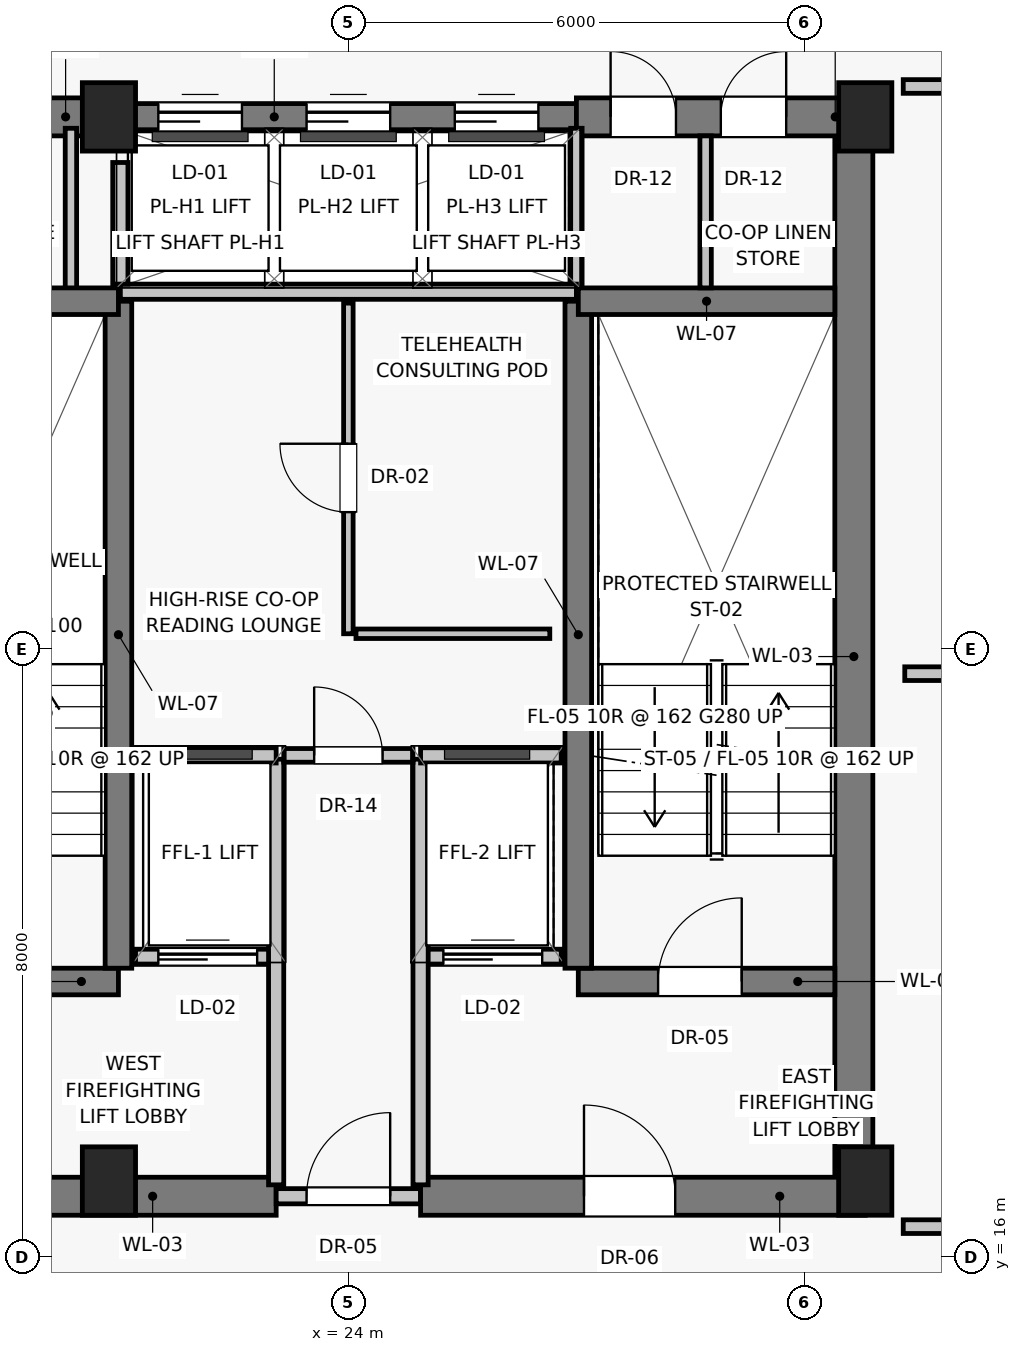
"""IFC4 building model, lengths in metres.
Left out: names, types, materials, properties, quantities, classifications, styles, units other than length and angle.
Written with IfcOpenShell. Run it as: python <this file> out.ifc"""

import sys

from ifc_helpers import new_model, si_unit, direction, frame, frame_2d, origin, origin_2d, place, context, subcontext, project, spatial, rectangle, extrude, source, transform, mapped, element, fill, save


model = new_model("IFC4")
c1 = context("Model", 3, precision=1e-05, world=origin(), true_north=direction((0.0, 1.0)))
c2 = subcontext(c1, "Body", "Model", "MODEL_VIEW")
j1 = project(units=[si_unit("LENGTHUNIT", "METRE"), si_unit("PLANEANGLEUNIT", "RADIAN")], contexts=[c1])
p1 = place(None, origin())
s1 = spatial("IfcSite", under=j1, at=p1, CompositionType="ELEMENT")
p2 = place(p1, origin())
s2 = spatial("IfcBuilding", under=s1, at=p2, CompositionType="ELEMENT")
p3 = place(p2, frame((0.0, 0.0, 222.15)))
s3 = spatial("IfcBuildingStorey", under=s2, at=p3, CompositionType="ELEMENT", Elevation=222.15)
for number, where, z_axis, x_axis in (
    (1, (20.85, 17.0, 0.0), (0.0, 0.0, 1.0), (1.0, 0.0, 0.0)),
    (2, (30.8, 17.0, 0.0), (0.0, 0.0, 1.0), (1.0, 0.0, 0.0)),
    (3, (20.85, 31.0, 0.0), (0.0, 0.0, 1.0), (1.0, 0.0, 0.0)),
    (4, (30.8, 31.0, 0.0), (0.0, 0.0, 1.0), (1.0, 0.0, 0.0)),
):
    element("IfcColumn", number, at=place(p3, frame(where, z_axis=z_axis, x_axis=x_axis)), inside=s3, PredefinedType="PILASTER", context=c2, shape_type="SweptSolid", body=[
        extrude(rectangle(XDim=0.7, YDim=0.9, at=origin_2d()), origin(), (0.0, 0.0, 1.0), 3.25),
    ])
p4 = place(p3, frame((30.65, 16.8, 0.0), z_axis=(0.0, 0.0, 1.0), x_axis=(0.0, 1.0, 0.0)))
e5 = element("IfcWall", 5, at=p4, inside=s3, PredefinedType="SHEAR", context=c2, shape_type="SweptSolid", body=[
    extrude(rectangle(XDim=14.2, YDim=0.5, at=frame_2d((7.1, 0.0))), origin(), (0.0, 0.0, 1.0), 2.93),
])
p5 = place(p3, frame((17.2, 16.8, 0.0), z_axis=(0.0, 0.0, 1.0), x_axis=(1.0, 0.0, 0.0)))
e6 = element("IfcWall", 6, at=p5, inside=s3, PredefinedType="SHEAR", context=c2, shape_type="SweptSolid", body=[
    extrude(rectangle(XDim=5.85, YDim=0.5, at=frame_2d((2.925, 0.0))), origin(), (0.0, 0.0, 1.0), 2.93),
])
p6 = place(p5, frame((1.15, 0.0, 0.0)))
e7 = element("IfcOpeningElement", 7, at=p6, cuts=e6, PredefinedType="OPENING", context=c2, shape_type="SweptSolid", body=[
    extrude(rectangle(XDim=1.2, YDim=2.03, at=frame_2d((0.6, 1.015))), frame((0.0, 0.26, 0.0), z_axis=(0.0, -1.0, 0.0), x_axis=(1.0, 0.0, 0.0)), (0.0, 0.0, 1.0), 0.52),
])
p7 = place(p3, frame((23.05, 16.8, 0.0), z_axis=(0.0, 0.0, 1.0), x_axis=(1.0, 0.0, 0.0)))
e8 = element("IfcWall", 8, at=p7, inside=s3, PredefinedType="SOLIDWALL", context=c2, shape_type="SweptSolid", body=[
    extrude(rectangle(XDim=1.9, YDim=0.2, at=frame_2d((0.95, 0.0))), origin(), (0.0, 0.0, 1.0), 2.08),
])
p8 = place(p7, frame((0.4, 0.0, 0.0)))
e9 = element("IfcOpeningElement", 9, at=p8, cuts=e8, PredefinedType="OPENING", context=c2, shape_type="SweptSolid", body=[
    extrude(rectangle(XDim=1.1, YDim=2.03, at=frame_2d((0.55, 1.015))), frame((0.0, 0.11, 0.0), z_axis=(0.0, -1.0, 0.0), x_axis=(1.0, 0.0, 0.0)), (0.0, 0.0, 1.0), 0.22),
])
p9 = place(p3, frame((24.95, 16.8, 0.0), z_axis=(0.0, 0.0, 1.0), x_axis=(1.0, 0.0, 0.0)))
e10 = element("IfcWall", 10, at=p9, inside=s3, PredefinedType="SHEAR", context=c2, shape_type="SweptSolid", body=[
    extrude(rectangle(XDim=5.85, YDim=0.5, at=frame_2d((2.925, 0.0))), origin(), (0.0, 0.0, 1.0), 2.93),
])
p10 = place(p9, frame((2.15, 0.0, 0.0)))
e11 = element("IfcOpeningElement", 11, at=p10, cuts=e10, PredefinedType="OPENING", context=c2, shape_type="SweptSolid", body=[
    extrude(rectangle(XDim=1.2, YDim=2.03, at=frame_2d((0.6, 1.015))), frame((0.0, 0.26, 0.0), z_axis=(0.0, -1.0, 0.0), x_axis=(1.0, 0.0, 0.0)), (0.0, 0.0, 1.0), 0.52),
])
p11 = place(p3, frame((17.2, 31.0, 0.0), z_axis=(0.0, 0.0, 1.0), x_axis=(1.0, 0.0, 0.0)))
e12 = element("IfcWall", 12, at=p11, inside=s3, PredefinedType="SHEAR", context=c2, shape_type="SweptSolid", body=[
    extrude(rectangle(XDim=3.8, YDim=0.5, at=frame_2d((1.9, 0.0))), origin(), (0.0, 0.0, 1.0), 2.93),
])
p12 = place(p11, frame((1.25, 0.0, 0.0)))
e13 = element("IfcOpeningElement", 13, at=p12, cuts=e12, PredefinedType="OPENING", context=c2, shape_type="SweptSolid", body=[
    extrude(rectangle(XDim=0.86, YDim=2.01, at=frame_2d((0.43, 1.005))), frame((0.0, 0.26, 0.0), z_axis=(0.0, -1.0, 0.0), x_axis=(1.0, 0.0, 0.0)), (0.0, 0.0, 1.0), 0.52),
])
p13 = place(p3, frame((21.0, 31.0, 0.0), z_axis=(0.0, 0.0, 1.0), x_axis=(1.0, 0.0, 0.0)))
e14 = element("IfcWall", 14, at=p13, inside=s3, PredefinedType="SHEAR", context=c2, shape_type="SweptSolid", body=[
    extrude(rectangle(XDim=6.0, YDim=0.35, at=frame_2d((3.0, 0.0))), origin(), (0.0, 0.0, 1.0), 2.93),
])
p14 = place(p13, frame((0.5, 0.0, 0.0)))
e15 = element("IfcOpeningElement", 15, at=p14, cuts=e14, PredefinedType="OPENING", context=c2, shape_type="SweptSolid", body=[
    extrude(rectangle(XDim=1.1, YDim=2.08, at=frame_2d((0.55, 1.04))), frame((0.0, 0.185, 0.0), z_axis=(0.0, -1.0, 0.0), x_axis=(1.0, 0.0, 0.0)), (0.0, 0.0, 1.0), 0.37),
])
p15 = place(p13, frame((2.45, 0.0, 0.0)))
e16 = element("IfcOpeningElement", 16, at=p15, cuts=e14, PredefinedType="OPENING", context=c2, shape_type="SweptSolid", body=[
    extrude(rectangle(XDim=1.1, YDim=2.08, at=frame_2d((0.55, 1.04))), frame((0.0, 0.185, 0.0), z_axis=(0.0, -1.0, 0.0), x_axis=(1.0, 0.0, 0.0)), (0.0, 0.0, 1.0), 0.37),
])
p16 = place(p13, frame((4.4, 0.0, 0.0)))
e17 = element("IfcOpeningElement", 17, at=p16, cuts=e14, PredefinedType="OPENING", context=c2, shape_type="SweptSolid", body=[
    extrude(rectangle(XDim=1.1, YDim=2.08, at=frame_2d((0.55, 1.04))), frame((0.0, 0.185, 0.0), z_axis=(0.0, -1.0, 0.0), x_axis=(1.0, 0.0, 0.0)), (0.0, 0.0, 1.0), 0.37),
])
p17 = place(p3, frame((27.0, 31.0, 0.0), z_axis=(0.0, 0.0, 1.0), x_axis=(1.0, 0.0, 0.0)))
e18 = element("IfcWall", 18, at=p17, inside=s3, PredefinedType="SHEAR", context=c2, shape_type="SweptSolid", body=[
    extrude(rectangle(XDim=3.8, YDim=0.5, at=frame_2d((1.9, 0.0))), origin(), (0.0, 0.0, 1.0), 2.93),
])
p18 = place(p17, frame((0.45, 0.0, 0.0)))
e19 = element("IfcOpeningElement", 19, at=p18, cuts=e18, PredefinedType="OPENING", context=c2, shape_type="SweptSolid", body=[
    extrude(rectangle(XDim=0.86, YDim=2.01, at=frame_2d((0.43, 1.005))), frame((0.0, 0.26, 0.0), z_axis=(0.0, -1.0, 0.0), x_axis=(1.0, 0.0, 0.0)), (0.0, 0.0, 1.0), 0.52),
])
p19 = place(p17, frame((1.9, 0.0, 0.0)))
e20 = element("IfcOpeningElement", 20, at=p19, cuts=e18, PredefinedType="OPENING", context=c2, shape_type="SweptSolid", body=[
    extrude(rectangle(XDim=0.86, YDim=2.01, at=frame_2d((0.43, 1.005))), frame((0.0, 0.26, 0.0), z_axis=(0.0, -1.0, 0.0), x_axis=(1.0, 0.0, 0.0)), (0.0, 0.0, 1.0), 0.52),
])
for number, where, z_axis, x_axis in (
    (21, (20.35, 28.65, 0.0), (0.0, 0.0, 1.0), (0.0, 1.0, 0.0)),
    (22, (27.0, 28.65, 0.0), (0.0, 0.0, 1.0), (0.0, 1.0, 0.0)),
):
    element("IfcWall", number, at=place(p3, frame(where, z_axis=z_axis, x_axis=x_axis)), inside=s3, PredefinedType="PARTITIONING", context=c2, shape_type="SweptSolid", body=[
        extrude(rectangle(XDim=2.2, YDim=0.15, at=frame_2d((1.1, 0.0))), origin(), (0.0, 0.0, 1.0), 2.93),
    ])
p20 = place(p3, frame((17.6, 19.625, 0.0), z_axis=(0.0, 0.0, 1.0), x_axis=(1.0, 0.0, 0.0)))
e23 = element("IfcWall", 23, at=p20, inside=s3, PredefinedType="SHEAR", context=c2, shape_type="SweptSolid", body=[
    extrude(rectangle(XDim=3.375, YDim=0.35, at=frame_2d((1.688, 0.0))), origin(), (0.0, 0.0, 1.0), 2.93),
])
p21 = place(p20, frame((1.05, 0.0, 0.0)))
e24 = element("IfcOpeningElement", 24, at=p21, cuts=e23, PredefinedType="OPENING", context=c2, shape_type="SweptSolid", body=[
    extrude(rectangle(XDim=1.1, YDim=2.03, at=frame_2d((0.55, 1.015))), frame((0.0, 0.185, 0.0), z_axis=(0.0, -1.0, 0.0), x_axis=(1.0, 0.0, 0.0)), (0.0, 0.0, 1.0), 0.37),
])
p22 = place(p3, frame((21.2, 19.95, 0.0), z_axis=(0.0, 0.0, 1.0), x_axis=(1.0, 0.0, 0.0)))
e25 = element("IfcWall", 25, at=p22, inside=s3, PredefinedType="SOLIDWALL", context=c2, shape_type="SweptSolid", body=[
    extrude(rectangle(XDim=1.85, YDim=0.2, at=frame_2d((0.925, 0.0))), origin(), (0.0, 0.0, 1.0), 2.93),
])
p23 = place(p22, frame((0.3, 0.0, 0.0)))
e26 = element("IfcOpeningElement", 26, at=p23, cuts=e25, PredefinedType="OPENING", context=c2, shape_type="SweptSolid", body=[
    extrude(rectangle(XDim=1.3, YDim=2.25, at=frame_2d((0.65, 1.125))), frame((0.0, 0.11, 0.0), z_axis=(0.0, -1.0, 0.0), x_axis=(1.0, 0.0, 0.0)), (0.0, 0.0, 1.0), 0.22),
])
p24 = place(p3, frame((24.95, 19.95, 0.0), z_axis=(0.0, 0.0, 1.0), x_axis=(1.0, 0.0, 0.0)))
e27 = element("IfcWall", 27, at=p24, inside=s3, PredefinedType="SOLIDWALL", context=c2, shape_type="SweptSolid", body=[
    extrude(rectangle(XDim=1.85, YDim=0.2, at=frame_2d((0.925, 0.0))), origin(), (0.0, 0.0, 1.0), 2.93),
])
p25 = place(p24, frame((0.3, 0.0, 0.0)))
e28 = element("IfcOpeningElement", 28, at=p25, cuts=e27, PredefinedType="OPENING", context=c2, shape_type="SweptSolid", body=[
    extrude(rectangle(XDim=1.3, YDim=2.25, at=frame_2d((0.65, 1.125))), frame((0.0, 0.11, 0.0), z_axis=(0.0, -1.0, 0.0), x_axis=(1.0, 0.0, 0.0)), (0.0, 0.0, 1.0), 0.22),
])
p26 = place(p3, frame((27.025, 19.625, 0.0), z_axis=(0.0, 0.0, 1.0), x_axis=(1.0, 0.0, 0.0)))
e29 = element("IfcWall", 29, at=p26, inside=s3, PredefinedType="SHEAR", context=c2, shape_type="SweptSolid", body=[
    extrude(rectangle(XDim=3.375, YDim=0.35, at=frame_2d((1.688, 0.0))), origin(), (0.0, 0.0, 1.0), 2.93),
])
p27 = place(p26, frame((1.05, 0.0, 0.0)))
e30 = element("IfcOpeningElement", 30, at=p27, cuts=e29, PredefinedType="OPENING", context=c2, shape_type="SweptSolid", body=[
    extrude(rectangle(XDim=1.1, YDim=2.03, at=frame_2d((0.55, 1.015))), frame((0.0, 0.185, 0.0), z_axis=(0.0, -1.0, 0.0), x_axis=(1.0, 0.0, 0.0)), (0.0, 0.0, 1.0), 0.37),
])
for number, where, z_axis, x_axis in (
    (31, (20.975, 19.8, 0.0), (0.0, 0.0, 1.0), (0.0, 1.0, 0.0)),
    (32, (27.025, 19.8, 0.0), (0.0, 0.0, 1.0), (0.0, 1.0, 0.0)),
):
    element("IfcWall", number, at=place(p3, frame(where, z_axis=z_axis, x_axis=x_axis)), inside=s3, PredefinedType="SHEAR", context=c2, shape_type="SweptSolid", body=[
        extrude(rectangle(XDim=8.775, YDim=0.35, at=frame_2d((4.387, 0.0))), origin(), (0.0, 0.0, 1.0), 2.93),
    ])
for number, where, z_axis, x_axis in (
    (33, (17.6, 28.575, 0.0), (0.0, 0.0, 1.0), (1.0, 0.0, 0.0)),
    (34, (27.025, 28.575, 0.0), (0.0, 0.0, 1.0), (1.0, 0.0, 0.0)),
):
    element("IfcWall", number, at=place(p3, frame(where, z_axis=z_axis, x_axis=x_axis)), inside=s3, PredefinedType="SHEAR", context=c2, shape_type="SweptSolid", body=[
        extrude(rectangle(XDim=3.375, YDim=0.35, at=frame_2d((1.688, 0.0))), origin(), (0.0, 0.0, 1.0), 2.93),
    ])
for number, where, z_axis, x_axis in (
    (35, (23.05, 16.95, 0.0), (0.0, 0.0, 1.0), (0.0, 1.0, 0.0)),
    (36, (24.95, 16.95, 0.0), (0.0, 0.0, 1.0), (0.0, 1.0, 0.0)),
):
    element("IfcWall", number, at=place(p3, frame(where, z_axis=z_axis, x_axis=x_axis)), inside=s3, PredefinedType="SOLIDWALL", context=c2, shape_type="SweptSolid", body=[
        extrude(rectangle(XDim=5.6, YDim=0.2, at=frame_2d((2.8, 0.0))), origin(), (0.0, 0.0, 1.0), 2.93),
    ])
for number, where, z_axis, x_axis in (
    (37, (21.2, 22.6, 0.0), (0.0, 0.0, 1.0), (1.0, 0.0, 0.0)),
    (38, (24.95, 22.6, 0.0), (0.0, 0.0, 1.0), (1.0, 0.0, 0.0)),
):
    element("IfcWall", number, at=place(p3, frame(where, z_axis=z_axis, x_axis=x_axis)), inside=s3, PredefinedType="SOLIDWALL", context=c2, shape_type="SweptSolid", body=[
        extrude(rectangle(XDim=1.85, YDim=0.2, at=frame_2d((0.925, 0.0))), origin(), (0.0, 0.0, 1.0), 2.93),
    ])
p28 = place(p3, frame((21.0, 28.7, 0.0), z_axis=(0.0, 0.0, 1.0), x_axis=(1.0, 0.0, 0.0)))
e39 = element("IfcWall", 39, at=p28, inside=s3, PredefinedType="SOLIDWALL", context=c2, shape_type="SweptSolid", body=[
    extrude(rectangle(XDim=6.0, YDim=0.2, at=frame_2d((3.0, 0.0))), origin(), (0.0, 0.0, 1.0), 2.93),
])
p29 = place(p3, frame((21.0, 28.8, 0.0), z_axis=(0.0, 0.0, 1.0), x_axis=(0.0, 1.0, 0.0)))
e40 = element("IfcWall", 40, at=p29, inside=s3, PredefinedType="SOLIDWALL", context=c2, shape_type="SweptSolid", body=[
    extrude(rectangle(XDim=1.6, YDim=0.2, at=frame_2d((0.8, 0.0))), origin(), (0.0, 0.0, 1.0), 2.93),
])
p30 = place(p3, frame((23.15, 22.6, 0.0), z_axis=(0.0, 0.0, 1.0), x_axis=(1.0, 0.0, 0.0)))
e41 = element("IfcWall", 41, at=p30, inside=s3, PredefinedType="PARTITIONING", context=c2, shape_type="SweptSolid", body=[
    extrude(rectangle(XDim=1.7, YDim=0.18, at=frame_2d((0.85, 0.0))), origin(), (0.0, 0.0, 1.0), 2.93),
])
p31 = place(p30, frame((0.4, 0.0, 0.0)))
e42 = element("IfcOpeningElement", 42, at=p31, cuts=e41, PredefinedType="OPENING", context=c2, shape_type="SweptSolid", body=[
    extrude(rectangle(XDim=0.9, YDim=2.01, at=frame_2d((0.45, 1.005))), frame((0.0, 0.1, 0.0), z_axis=(0.0, -1.0, 0.0), x_axis=(1.0, 0.0, 0.0)), (0.0, 0.0, 1.0), 0.2),
])
p32 = place(p3, frame((24.1, 24.2, 0.0), z_axis=(0.0, 0.0, 1.0), x_axis=(1.0, 0.0, 0.0)))
e43 = element("IfcWall", 43, at=p32, inside=s3, PredefinedType="PARTITIONING", context=c2, shape_type="SweptSolid", body=[
    extrude(rectangle(XDim=2.55, YDim=0.125, at=frame_2d((1.275, 0.0))), origin(), (0.0, 0.0, 1.0), 2.93),
])
p33 = place(p3, frame((24.0, 24.2, 0.0), z_axis=(0.0, 0.0, 1.0), x_axis=(0.0, 1.0, 0.0)))
e44 = element("IfcWall", 44, at=p33, inside=s3, PredefinedType="PARTITIONING", context=c2, shape_type="SweptSolid", body=[
    extrude(rectangle(XDim=4.35, YDim=0.125, at=frame_2d((2.175, 0.0))), origin(), (0.0, 0.0, 1.0), 2.93),
])
p34 = place(p33, frame((1.6, 0.0, 0.0)))
e45 = element("IfcOpeningElement", 45, at=p34, cuts=e44, PredefinedType="OPENING", context=c2, shape_type="SweptSolid", body=[
    extrude(rectangle(XDim=0.9, YDim=2.01, at=frame_2d((0.45, 1.005))), frame((0.0, 0.073, 0.0), z_axis=(0.0, -1.0, 0.0), x_axis=(1.0, 0.0, 0.0)), (0.0, 0.0, 1.0), 0.145),
])
p35 = place(p3, frame((28.7, 28.75, 0.0), z_axis=(0.0, 0.0, 1.0), x_axis=(0.0, 1.0, 0.0)))
e46 = element("IfcWall", 46, at=p35, inside=s3, PredefinedType="PARTITIONING", context=c2, shape_type="SweptSolid", body=[
    extrude(rectangle(XDim=2.0, YDim=0.15, at=frame_2d((1.0, 0.0))), origin(), (0.0, 0.0, 1.0), 2.93),
])
p36 = place(p3, frame((31.32, 23.675, 0.0), z_axis=(0.0, 0.0, 1.0), x_axis=(1.0, 0.0, 0.0)))
e47 = element("IfcWall", 47, at=p36, inside=s3, PredefinedType="PARTITIONING", context=c2, shape_type="SweptSolid", body=[
    extrude(rectangle(XDim=10.45, YDim=0.18, at=frame_2d((5.225, 0.0))), origin(), (0.0, 0.0, 1.0), 2.93),
])
p37 = place(p3, frame((31.3, 16.4, 0.0), z_axis=(0.0, 0.0, 1.0), x_axis=(1.0, 0.0, 0.0)))
e48 = element("IfcWall", 48, at=p37, inside=s3, PredefinedType="PARTITIONING", context=c2, shape_type="SweptSolid", body=[
    extrude(rectangle(XDim=1.92, YDim=0.18, at=frame_2d((0.96, 0.0))), origin(), (0.0, 0.0, 1.0), 2.93),
])
p38 = place(p37, frame((0.72, 0.0, 0.0)))
e49 = element("IfcOpeningElement", 49, at=p38, cuts=e48, PredefinedType="OPENING", context=c2, shape_type="SweptSolid", body=[
    extrude(rectangle(XDim=1.0, YDim=2.01, at=frame_2d((0.5, 1.005))), frame((0.0, 0.1, 0.0), z_axis=(0.0, -1.0, 0.0), x_axis=(1.0, 0.0, 0.0)), (0.0, 0.0, 1.0), 0.2),
])
p39 = place(p3, frame((31.3, 31.4, 0.0), z_axis=(0.0, 0.0, 1.0), x_axis=(1.0, 0.0, 0.0)))
e50 = element("IfcWall", 50, at=p39, inside=s3, PredefinedType="PARTITIONING", context=c2, shape_type="SweptSolid", body=[
    extrude(rectangle(XDim=1.92, YDim=0.18, at=frame_2d((0.96, 0.0))), origin(), (0.0, 0.0, 1.0), 2.93),
])
p40 = place(p39, frame((0.72, 0.0, 0.0)))
e51 = element("IfcOpeningElement", 51, at=p40, cuts=e50, PredefinedType="OPENING", context=c2, shape_type="SweptSolid", body=[
    extrude(rectangle(XDim=1.0, YDim=2.01, at=frame_2d((0.5, 1.005))), frame((0.0, 0.1, 0.0), z_axis=(0.0, -1.0, 0.0), x_axis=(1.0, 0.0, 0.0)), (0.0, 0.0, 1.0), 0.2),
])
m1 = source(origin(), c2, "Body", "SweptSolid", [
    extrude(rectangle(XDim=1.1, YDim=2.03, at=frame_2d((0.55, 1.015))), frame((0.0, 0.025, 0.0), z_axis=(0.0, -1.0, 0.0), x_axis=(1.0, 0.0, 0.0)), (0.0, 0.0, 1.0), 0.05),
])
p41 = place(p8, origin())
e52 = element("IfcDoor", 52, at=p41, inside=s3, OperationType="SINGLE_SWING_RIGHT", PredefinedType="DOOR", context=c2, shape_type="MappedRepresentation", body=[
    mapped(m1, transform((0.0, 0.0, 0.0), scale=1.0)),
])
fill(e9, e52)
m2 = source(origin(), c2, "Body", "SweptSolid", [
    extrude(rectangle(XDim=1.2, YDim=2.03, at=frame_2d((0.6, 1.015))), frame((0.0, 0.025, 0.0), z_axis=(0.0, -1.0, 0.0), x_axis=(1.0, 0.0, 0.0)), (0.0, 0.0, 1.0), 0.05),
])
p42 = place(p10, origin())
e53 = element("IfcDoor", 53, at=p42, inside=s3, OperationType="SINGLE_SWING_LEFT", PredefinedType="DOOR", context=c2, shape_type="MappedRepresentation", body=[
    mapped(m2, transform((0.0, 0.0, 0.0), scale=1.0)),
])
fill(e11, e53)
m3 = source(origin(), c2, "Body", "SweptSolid", [
    extrude(rectangle(XDim=1.1, YDim=2.08, at=frame_2d((0.55, 1.04))), frame((0.0, 0.025, 0.0), z_axis=(0.0, -1.0, 0.0), x_axis=(1.0, 0.0, 0.0)), (0.0, 0.0, 1.0), 0.05),
])
p43 = place(p14, origin())
e54 = element("IfcDoor", 54, at=p43, inside=s3, OperationType="SLIDING_TO_LEFT", PredefinedType="DOOR", context=c2, shape_type="MappedRepresentation", body=[
    mapped(m3, transform((0.0, 0.0, 0.0), scale=1.0)),
])
fill(e15, e54)
p44 = place(p15, origin())
e55 = element("IfcDoor", 55, at=p44, inside=s3, OperationType="SLIDING_TO_LEFT", PredefinedType="DOOR", context=c2, shape_type="MappedRepresentation", body=[
    mapped(m3, transform((0.0, 0.0, 0.0), scale=1.0)),
])
fill(e16, e55)
p45 = place(p16, origin())
e56 = element("IfcDoor", 56, at=p45, inside=s3, OperationType="SLIDING_TO_LEFT", PredefinedType="DOOR", context=c2, shape_type="MappedRepresentation", body=[
    mapped(m3, transform((0.0, 0.0, 0.0), scale=1.0)),
])
fill(e17, e56)
m4 = source(origin(), c2, "Body", "SweptSolid", [
    extrude(rectangle(XDim=0.86, YDim=2.01, at=frame_2d((0.43, 1.005))), frame((0.0, 0.025, 0.0), z_axis=(0.0, -1.0, 0.0), x_axis=(1.0, 0.0, 0.0)), (0.0, 0.0, 1.0), 0.05),
])
p46 = place(p18, origin())
e57 = element("IfcDoor", 57, at=p46, inside=s3, OperationType="SINGLE_SWING_LEFT", PredefinedType="DOOR", context=c2, shape_type="MappedRepresentation", body=[
    mapped(m4, transform((0.0, 0.0, 0.0), scale=1.0)),
])
fill(e19, e57)
p47 = place(p19, origin())
e58 = element("IfcDoor", 58, at=p47, inside=s3, OperationType="SINGLE_SWING_RIGHT", PredefinedType="DOOR", context=c2, shape_type="MappedRepresentation", body=[
    mapped(m4, transform((0.0, 0.0, 0.0), scale=1.0)),
])
fill(e20, e58)
m5 = source(origin(), c2, "Body", "SweptSolid", [
    extrude(rectangle(XDim=1.3, YDim=2.25, at=frame_2d((0.65, 1.125))), frame((0.0, 0.025, 0.0), z_axis=(0.0, -1.0, 0.0), x_axis=(1.0, 0.0, 0.0)), (0.0, 0.0, 1.0), 0.05),
])
p48 = place(p23, origin())
e59 = element("IfcDoor", 59, at=p48, inside=s3, OperationType="SLIDING_TO_LEFT", PredefinedType="DOOR", context=c2, shape_type="MappedRepresentation", body=[
    mapped(m5, transform((0.0, 0.0, 0.0), scale=1.0)),
])
fill(e26, e59)
p49 = place(p25, origin())
e60 = element("IfcDoor", 60, at=p49, inside=s3, OperationType="SLIDING_TO_LEFT", PredefinedType="DOOR", context=c2, shape_type="MappedRepresentation", body=[
    mapped(m5, transform((0.0, 0.0, 0.0), scale=1.0)),
])
fill(e28, e60)
p50 = place(p27, origin())
e61 = element("IfcDoor", 61, at=p50, inside=s3, OperationType="SINGLE_SWING_RIGHT", PredefinedType="DOOR", context=c2, shape_type="MappedRepresentation", body=[
    mapped(m1, transform((0.0, 0.0, 0.0), scale=1.0)),
])
fill(e30, e61)
m6 = source(origin(), c2, "Body", "SweptSolid", [
    extrude(rectangle(XDim=0.9, YDim=2.01, at=frame_2d((0.45, 1.005))), frame((0.0, 0.025, 0.0), z_axis=(0.0, -1.0, 0.0), x_axis=(1.0, 0.0, 0.0)), (0.0, 0.0, 1.0), 0.05),
])
p51 = place(p31, origin())
e62 = element("IfcDoor", 62, at=p51, inside=s3, OperationType="SINGLE_SWING_LEFT", PredefinedType="DOOR", context=c2, shape_type="MappedRepresentation", body=[
    mapped(m6, transform((0.0, 0.0, 0.0), scale=1.0)),
])
fill(e42, e62)
p52 = place(p34, origin())
e63 = element("IfcDoor", 63, at=p52, inside=s3, OperationType="SINGLE_SWING_RIGHT", PredefinedType="DOOR", context=c2, shape_type="MappedRepresentation", body=[
    mapped(m6, transform((0.0, 0.0, 0.0), scale=1.0)),
])
fill(e45, e63)
save(model, sys.argv[1])
